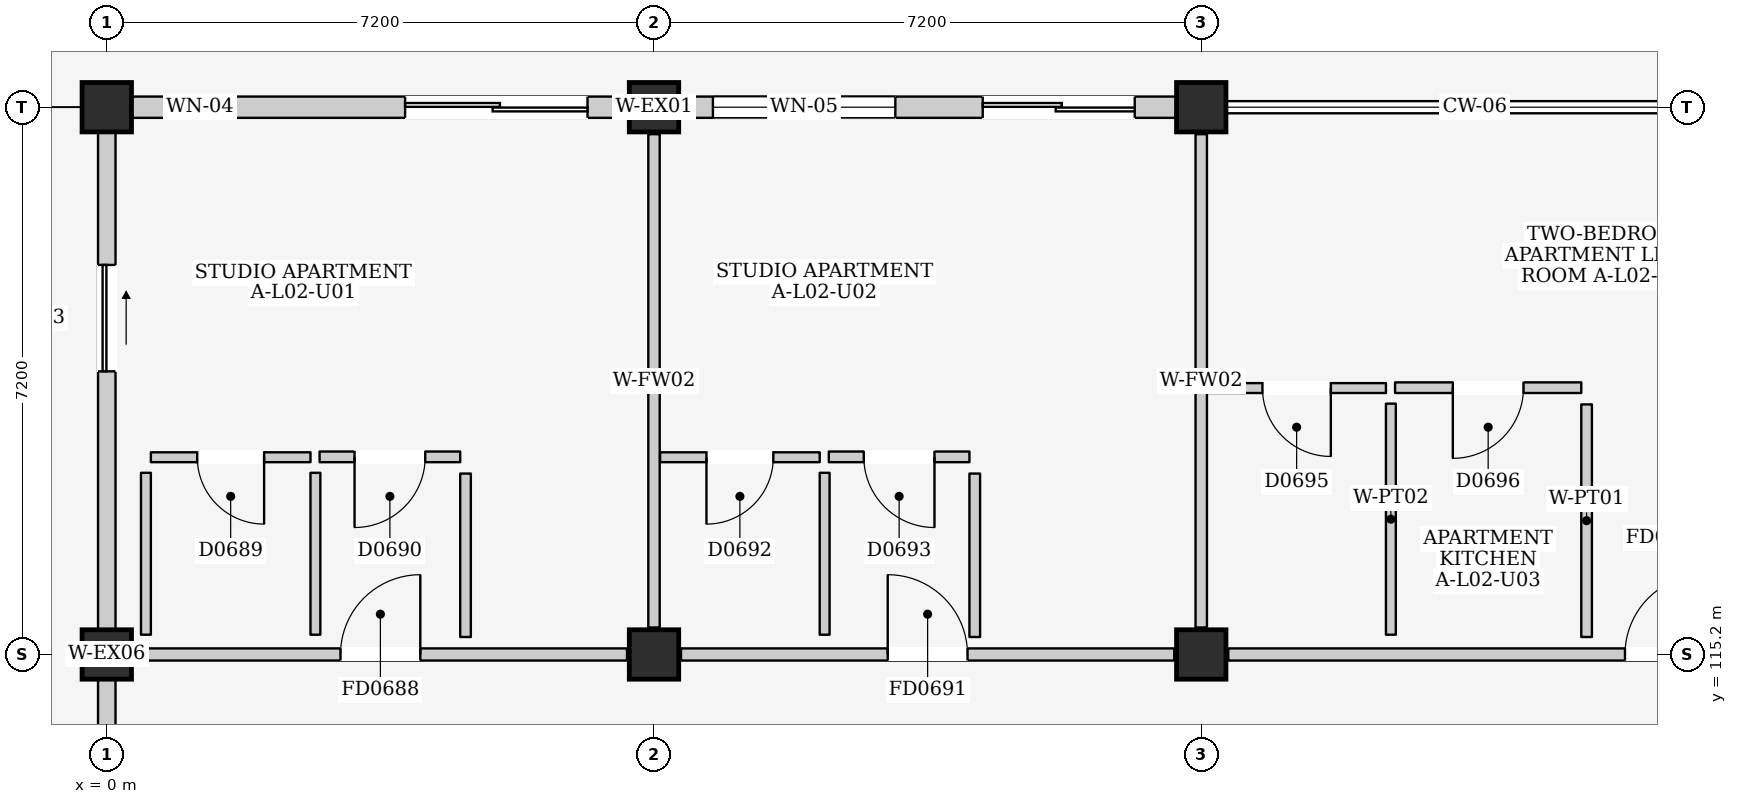
"""IFC4 building model, lengths in metres.
Left out: names, types, materials, properties, quantities, classifications, styles, units other than length and angle.
Written with IfcOpenShell. Run it as: python <this file> out.ifc"""

import sys

from ifc_helpers import new_model, si_unit, direction, frame, frame_2d, origin, origin_2d, place, context, subcontext, project, spatial, rectangle, extrude, element, fill, save


model = new_model("IFC4")
c1 = context("Model", 3, precision=1e-05, world=origin(), true_north=direction((0.0, 1.0)))
c2 = subcontext(c1, "Body", "Model", "MODEL_VIEW")
j1 = project(units=[si_unit("LENGTHUNIT", "METRE"), si_unit("PLANEANGLEUNIT", "RADIAN")], contexts=[c1])
p1 = place(None, origin())
s1 = spatial("IfcSite", under=j1, at=p1, CompositionType="ELEMENT")
p2 = place(p1, origin())
s2 = spatial("IfcBuilding", under=s1, at=p2, CompositionType="ELEMENT")
p3 = place(p2, frame((0.0, 0.0, 9.0)))
s3 = spatial("IfcBuildingStorey", under=s2, at=p3, CompositionType="ELEMENT", Elevation=9.0)
for number, where, z_axis, x_axis in (
    (1, (0.0, 115.2, 0.0), (0.0, 0.0, 1.0), (1.0, 0.0, 0.0)),
    (2, (0.0, 122.4, 0.0), (0.0, 0.0, 1.0), (1.0, 0.0, 0.0)),
    (3, (7.2, 115.2, 0.0), (0.0, 0.0, 1.0), (1.0, 0.0, 0.0)),
    (4, (7.2, 122.4, 0.0), (0.0, 0.0, 1.0), (1.0, 0.0, 0.0)),
    (5, (14.4, 115.2, 0.0), (0.0, 0.0, 1.0), (1.0, 0.0, 0.0)),
    (6, (14.4, 122.4, 0.0), (0.0, 0.0, 1.0), (1.0, 0.0, 0.0)),
):
    element("IfcColumn", number, at=place(p3, frame(where, z_axis=z_axis, x_axis=x_axis)), inside=s3, PredefinedType="COLUMN", context=c2, shape_type="SweptSolid", body=[
        extrude(rectangle(XDim=0.65, YDim=0.65, at=origin_2d()), origin(), (0.0, 0.0, 1.0), 3.2),
    ])
p4 = place(p3, frame((0.325, 122.4, 0.0), z_axis=(0.0, 0.0, 1.0), x_axis=(1.0, 0.0, 0.0)))
e7 = element("IfcWall", 7, at=p4, inside=s3, PredefinedType="ELEMENTEDWALL", context=c2, shape_type="SweptSolid", body=[
    extrude(rectangle(XDim=6.55, YDim=0.28, at=frame_2d((3.275, 0.0))), origin(), (0.0, 0.0, 1.0), 2.425),
])
p5 = place(p4, frame((3.6, 0.0, 0.0)))
e8 = element("IfcOpeningElement", 8, at=p5, cuts=e7, PredefinedType="OPENING", context=c2, shape_type="SweptSolid", body=[
    extrude(rectangle(XDim=2.4, YDim=2.12, at=frame_2d((1.2, 1.06))), frame((0.0, 0.155, 0.0), z_axis=(0.0, -1.0, 0.0), x_axis=(1.0, 0.0, 0.0)), (0.0, 0.0, 1.0), 0.31),
])
p6 = place(p4, frame((0.45, 0.0, 0.9)))
e9 = element("IfcOpeningElement", 9, at=p6, cuts=e7, PredefinedType="OPENING", context=c2, shape_type="SweptSolid", body=[
    extrude(rectangle(XDim=0.9, YDim=1.1, at=frame_2d((0.45, 0.55))), frame((0.0, 0.155, 0.0), z_axis=(0.0, -1.0, 0.0), x_axis=(1.0, 0.0, 0.0)), (0.0, 0.0, 1.0), 0.31),
])
p7 = place(p3, frame((7.525, 122.4, 0.0), z_axis=(0.0, 0.0, 1.0), x_axis=(1.0, 0.0, 0.0)))
e10 = element("IfcWall", 10, at=p7, inside=s3, PredefinedType="ELEMENTEDWALL", context=c2, shape_type="SweptSolid", body=[
    extrude(rectangle(XDim=6.55, YDim=0.28, at=frame_2d((3.275, 0.0))), origin(), (0.0, 0.0, 1.0), 2.425),
])
p8 = place(p7, frame((4.0, 0.0, 0.0)))
e11 = element("IfcOpeningElement", 11, at=p8, cuts=e10, PredefinedType="OPENING", context=c2, shape_type="SweptSolid", body=[
    extrude(rectangle(XDim=2.0, YDim=2.12, at=frame_2d((1.0, 1.06))), frame((0.0, 0.155, 0.0), z_axis=(0.0, -1.0, 0.0), x_axis=(1.0, 0.0, 0.0)), (0.0, 0.0, 1.0), 0.31),
])
p9 = place(p7, frame((0.45, 0.0, 0.665)))
e12 = element("IfcOpeningElement", 12, at=p9, cuts=e10, PredefinedType="OPENING", context=c2, shape_type="SweptSolid", body=[
    extrude(rectangle(XDim=2.4, YDim=1.65, at=frame_2d((1.2, 0.825))), frame((0.0, 0.155, 0.0), z_axis=(0.0, -1.0, 0.0), x_axis=(1.0, 0.0, 0.0)), (0.0, 0.0, 1.0), 0.31),
])
p10 = place(p3, frame((0.0, 108.325, 0.0), z_axis=(0.0, 0.0, 1.0), x_axis=(0.0, 1.0, 0.0)))
e13 = element("IfcWall", 13, at=p10, inside=s3, PredefinedType="ELEMENTEDWALL", context=c2, shape_type="SweptSolid", body=[
    extrude(rectangle(XDim=6.55, YDim=0.23, at=frame_2d((3.275, 0.0))), origin(), (0.0, 0.0, 1.0), 2.425),
])
p11 = place(p10, frame((2.75, 0.0, 1.1)))
e14 = element("IfcOpeningElement", 14, at=p11, cuts=e13, PredefinedType="OPENING", context=c2, shape_type="SweptSolid", body=[
    extrude(rectangle(XDim=1.0, YDim=0.9, at=frame_2d((0.5, 0.45))), frame((0.0, 0.13, 0.0), z_axis=(0.0, -1.0, 0.0), x_axis=(1.0, 0.0, 0.0)), (0.0, 0.0, 1.0), 0.26),
])
p12 = place(p3, frame((0.0, 115.525, 0.0), z_axis=(0.0, 0.0, 1.0), x_axis=(0.0, 1.0, 0.0)))
e15 = element("IfcWall", 15, at=p12, inside=s3, PredefinedType="ELEMENTEDWALL", context=c2, shape_type="SweptSolid", body=[
    extrude(rectangle(XDim=6.55, YDim=0.23, at=frame_2d((3.275, 0.0))), origin(), (0.0, 0.0, 1.0), 2.425),
])
p13 = place(p12, frame((3.4, 0.0, 0.0)))
e16 = element("IfcOpeningElement", 16, at=p13, cuts=e15, PredefinedType="OPENING", context=c2, shape_type="SweptSolid", body=[
    extrude(rectangle(XDim=1.4, YDim=2.1, at=frame_2d((0.7, 1.05))), frame((0.0, 0.13, 0.0), z_axis=(0.0, -1.0, 0.0), x_axis=(1.0, 0.0, 0.0)), (0.0, 0.0, 1.0), 0.26),
])
p14 = place(p3, frame((0.355, 115.2, 0.0), z_axis=(0.0, 0.0, 1.0), x_axis=(1.0, 0.0, 0.0)))
e17 = element("IfcWall", 17, at=p14, inside=s3, PredefinedType="PARTITIONING", context=c2, shape_type="SweptSolid", body=[
    extrude(rectangle(XDim=6.49, YDim=0.16, at=frame_2d((3.245, 0.0))), origin(), (0.0, 0.0, 1.0), 2.295),
])
p15 = place(p14, frame((2.72, 0.0, 0.0)))
e18 = element("IfcOpeningElement", 18, at=p15, cuts=e17, PredefinedType="OPENING", context=c2, shape_type="SweptSolid", body=[
    extrude(rectangle(XDim=1.05, YDim=2.15, at=frame_2d((0.525, 1.075))), frame((0.0, 0.095, 0.0), z_axis=(0.0, -1.0, 0.0), x_axis=(1.0, 0.0, 0.0)), (0.0, 0.0, 1.0), 0.19),
])
p16 = place(p3, frame((7.2, 115.555, 0.0), z_axis=(0.0, 0.0, 1.0), x_axis=(0.0, 1.0, 0.0)))
e19 = element("IfcWall", 19, at=p16, inside=s3, PredefinedType="PARTITIONING", context=c2, shape_type="SweptSolid", body=[
    extrude(rectangle(XDim=6.49, YDim=0.15, at=frame_2d((3.245, 0.0))), origin(), (0.0, 0.0, 1.0), 2.395),
])
p17 = place(p3, frame((0.58, 117.795, 0.0), z_axis=(0.0, 0.0, 1.0), x_axis=(1.0, 0.0, 0.0)))
e20 = element("IfcWall", 20, at=p17, inside=s3, PredefinedType="PARTITIONING", context=c2, shape_type="SweptSolid", body=[
    extrude(rectangle(XDim=2.1, YDim=0.13, at=frame_2d((1.05, 0.0))), origin(), (0.0, 0.0, 1.0), 2.96),
])
p18 = place(p17, frame((0.61, 0.0, 0.0)))
e21 = element("IfcOpeningElement", 21, at=p18, cuts=e20, PredefinedType="OPENING", context=c2, shape_type="SweptSolid", body=[
    extrude(rectangle(XDim=0.88, YDim=2.1, at=frame_2d((0.44, 1.05))), frame((0.0, 0.08, 0.0), z_axis=(0.0, -1.0, 0.0), x_axis=(1.0, 0.0, 0.0)), (0.0, 0.0, 1.0), 0.16),
])
for number, where, z_axis, x_axis in (
    (22, (2.745, 115.46, 0.0), (0.0, 0.0, 1.0), (0.0, 1.0, 0.0)),
    (23, (0.515, 115.46, 0.0), (0.0, 0.0, 1.0), (0.0, 1.0, 0.0)),
):
    element("IfcWall", number, at=place(p3, frame(where, z_axis=z_axis, x_axis=x_axis)), inside=s3, PredefinedType="PARTITIONING", context=c2, shape_type="SweptSolid", body=[
        extrude(rectangle(XDim=2.13, YDim=0.13, at=frame_2d((1.065, 0.0))), origin(), (0.0, 0.0, 1.0), 2.96),
    ])
p19 = place(p3, frame((2.8, 117.8, 0.0), z_axis=(0.0, 0.0, 1.0), x_axis=(1.0, 0.0, 0.0)))
e24 = element("IfcWall", 24, at=p19, inside=s3, PredefinedType="PARTITIONING", context=c2, shape_type="SweptSolid", body=[
    extrude(rectangle(XDim=1.85, YDim=0.14, at=frame_2d((0.925, 0.0))), origin(), (0.0, 0.0, 1.0), 2.96),
])
p20 = place(p19, frame((0.46, 0.0, 0.0)))
e25 = element("IfcOpeningElement", 25, at=p20, cuts=e24, PredefinedType="OPENING", context=c2, shape_type="SweptSolid", body=[
    extrude(rectangle(XDim=0.93, YDim=2.14, at=frame_2d((0.465, 1.07))), frame((0.0, 0.085, 0.0), z_axis=(0.0, -1.0, 0.0), x_axis=(1.0, 0.0, 0.0)), (0.0, 0.0, 1.0), 0.17),
])
p21 = place(p3, frame((4.72, 115.43, 0.0), z_axis=(0.0, 0.0, 1.0), x_axis=(0.0, 1.0, 0.0)))
e26 = element("IfcWall", 26, at=p21, inside=s3, PredefinedType="PARTITIONING", context=c2, shape_type="SweptSolid", body=[
    extrude(rectangle(XDim=2.15, YDim=0.14, at=frame_2d((1.075, 0.0))), origin(), (0.0, 0.0, 1.0), 2.96),
])
p22 = place(p3, frame((7.555, 115.2, 0.0), z_axis=(0.0, 0.0, 1.0), x_axis=(1.0, 0.0, 0.0)))
e27 = element("IfcWall", 27, at=p22, inside=s3, PredefinedType="PARTITIONING", context=c2, shape_type="SweptSolid", body=[
    extrude(rectangle(XDim=6.49, YDim=0.16, at=frame_2d((3.245, 0.0))), origin(), (0.0, 0.0, 1.0), 2.295),
])
p23 = place(p22, frame((2.72, 0.0, 0.0)))
e28 = element("IfcOpeningElement", 28, at=p23, cuts=e27, PredefinedType="OPENING", context=c2, shape_type="SweptSolid", body=[
    extrude(rectangle(XDim=1.05, YDim=2.15, at=frame_2d((0.525, 1.075))), frame((0.0, 0.095, 0.0), z_axis=(0.0, -1.0, 0.0), x_axis=(1.0, 0.0, 0.0)), (0.0, 0.0, 1.0), 0.19),
])
p24 = place(p3, frame((14.4, 115.555, 0.0), z_axis=(0.0, 0.0, 1.0), x_axis=(0.0, 1.0, 0.0)))
e29 = element("IfcWall", 29, at=p24, inside=s3, PredefinedType="PARTITIONING", context=c2, shape_type="SweptSolid", body=[
    extrude(rectangle(XDim=6.49, YDim=0.15, at=frame_2d((3.245, 0.0))), origin(), (0.0, 0.0, 1.0), 2.395),
])
p25 = place(p3, frame((7.28, 117.795, 0.0), z_axis=(0.0, 0.0, 1.0), x_axis=(1.0, 0.0, 0.0)))
e30 = element("IfcWall", 30, at=p25, inside=s3, PredefinedType="PARTITIONING", context=c2, shape_type="SweptSolid", body=[
    extrude(rectangle(XDim=2.1, YDim=0.13, at=frame_2d((1.05, 0.0))), origin(), (0.0, 0.0, 1.0), 2.96),
])
p26 = place(p25, frame((0.61, 0.0, 0.0)))
e31 = element("IfcOpeningElement", 31, at=p26, cuts=e30, PredefinedType="OPENING", context=c2, shape_type="SweptSolid", body=[
    extrude(rectangle(XDim=0.88, YDim=2.1, at=frame_2d((0.44, 1.05))), frame((0.0, 0.08, 0.0), z_axis=(0.0, -1.0, 0.0), x_axis=(1.0, 0.0, 0.0)), (0.0, 0.0, 1.0), 0.16),
])
p27 = place(p3, frame((9.445, 115.46, 0.0), z_axis=(0.0, 0.0, 1.0), x_axis=(0.0, 1.0, 0.0)))
e32 = element("IfcWall", 32, at=p27, inside=s3, PredefinedType="PARTITIONING", context=c2, shape_type="SweptSolid", body=[
    extrude(rectangle(XDim=2.13, YDim=0.13, at=frame_2d((1.065, 0.0))), origin(), (0.0, 0.0, 1.0), 2.96),
])
p28 = place(p3, frame((9.5, 117.8, 0.0), z_axis=(0.0, 0.0, 1.0), x_axis=(1.0, 0.0, 0.0)))
e33 = element("IfcWall", 33, at=p28, inside=s3, PredefinedType="PARTITIONING", context=c2, shape_type="SweptSolid", body=[
    extrude(rectangle(XDim=1.85, YDim=0.14, at=frame_2d((0.925, 0.0))), origin(), (0.0, 0.0, 1.0), 2.96),
])
p29 = place(p28, frame((0.46, 0.0, 0.0)))
e34 = element("IfcOpeningElement", 34, at=p29, cuts=e33, PredefinedType="OPENING", context=c2, shape_type="SweptSolid", body=[
    extrude(rectangle(XDim=0.93, YDim=2.14, at=frame_2d((0.465, 1.07))), frame((0.0, 0.085, 0.0), z_axis=(0.0, -1.0, 0.0), x_axis=(1.0, 0.0, 0.0)), (0.0, 0.0, 1.0), 0.17),
])
p30 = place(p3, frame((11.42, 115.43, 0.0), z_axis=(0.0, 0.0, 1.0), x_axis=(0.0, 1.0, 0.0)))
e35 = element("IfcWall", 35, at=p30, inside=s3, PredefinedType="PARTITIONING", context=c2, shape_type="SweptSolid", body=[
    extrude(rectangle(XDim=2.15, YDim=0.14, at=frame_2d((1.075, 0.0))), origin(), (0.0, 0.0, 1.0), 2.96),
])
p31 = place(p3, frame((14.755, 115.2, 0.0), z_axis=(0.0, 0.0, 1.0), x_axis=(1.0, 0.0, 0.0)))
e36 = element("IfcWall", 36, at=p31, inside=s3, PredefinedType="PARTITIONING", context=c2, shape_type="SweptSolid", body=[
    extrude(rectangle(XDim=6.49, YDim=0.16, at=frame_2d((3.245, 0.0))), origin(), (0.0, 0.0, 1.0), 2.295),
])
p32 = place(p31, frame((5.22, 0.0, 0.0)))
e37 = element("IfcOpeningElement", 37, at=p32, cuts=e36, PredefinedType="OPENING", context=c2, shape_type="SweptSolid", body=[
    extrude(rectangle(XDim=1.05, YDim=2.15, at=frame_2d((0.525, 1.075))), frame((0.0, 0.095, 0.0), z_axis=(0.0, -1.0, 0.0), x_axis=(1.0, 0.0, 0.0)), (0.0, 0.0, 1.0), 0.19),
])
p33 = place(p3, frame((14.48, 118.705, 0.0), z_axis=(0.0, 0.0, 1.0), x_axis=(1.0, 0.0, 0.0)))
e38 = element("IfcWall", 38, at=p33, inside=s3, PredefinedType="PARTITIONING", context=c2, shape_type="SweptSolid", body=[
    extrude(rectangle(XDim=2.35, YDim=0.13, at=frame_2d((1.175, 0.0))), origin(), (0.0, 0.0, 1.0), 2.96),
])
p34 = place(p33, frame((0.725, 0.0, 0.0)))
e39 = element("IfcOpeningElement", 39, at=p34, cuts=e38, PredefinedType="OPENING", context=c2, shape_type="SweptSolid", body=[
    extrude(rectangle(XDim=0.9, YDim=2.1, at=frame_2d((0.45, 1.05))), frame((0.0, 0.08, 0.0), z_axis=(0.0, -1.0, 0.0), x_axis=(1.0, 0.0, 0.0)), (0.0, 0.0, 1.0), 0.16),
])
p35 = place(p3, frame((16.895, 115.46, 0.0), z_axis=(0.0, 0.0, 1.0), x_axis=(0.0, 1.0, 0.0)))
e40 = element("IfcWall", 40, at=p35, inside=s3, PredefinedType="PARTITIONING", context=c2, shape_type="SweptSolid", body=[
    extrude(rectangle(XDim=3.04, YDim=0.13, at=frame_2d((1.52, 0.0))), origin(), (0.0, 0.0, 1.0), 2.96),
])
p36 = place(p3, frame((16.95, 118.71, 0.0), z_axis=(0.0, 0.0, 1.0), x_axis=(1.0, 0.0, 0.0)))
e41 = element("IfcWall", 41, at=p36, inside=s3, PredefinedType="PARTITIONING", context=c2, shape_type="SweptSolid", body=[
    extrude(rectangle(XDim=2.45, YDim=0.14, at=frame_2d((1.225, 0.0))), origin(), (0.0, 0.0, 1.0), 2.96),
])
p37 = place(p36, frame((0.76, 0.0, 0.0)))
e42 = element("IfcOpeningElement", 42, at=p37, cuts=e41, PredefinedType="OPENING", context=c2, shape_type="SweptSolid", body=[
    extrude(rectangle(XDim=0.93, YDim=2.14, at=frame_2d((0.465, 1.07))), frame((0.0, 0.085, 0.0), z_axis=(0.0, -1.0, 0.0), x_axis=(1.0, 0.0, 0.0)), (0.0, 0.0, 1.0), 0.17),
])
p38 = place(p3, frame((19.47, 115.43, 0.0), z_axis=(0.0, 0.0, 1.0), x_axis=(0.0, 1.0, 0.0)))
e43 = element("IfcWall", 43, at=p38, inside=s3, PredefinedType="PARTITIONING", context=c2, shape_type="SweptSolid", body=[
    extrude(rectangle(XDim=3.06, YDim=0.14, at=frame_2d((1.53, 0.0))), origin(), (0.0, 0.0, 1.0), 2.96),
])
p39 = place(p5, frame((2.4, 0.0, 0.0), z_axis=(0.0, 0.0, 1.0), x_axis=(-1.0, 0.0, 0.0)))
e44 = element("IfcDoor", 44, at=p39, inside=s3, OperationType="DOUBLE_DOOR_SLIDING", PredefinedType="DOOR", context=c2, shape_type="SweptSolid", body=[
    extrude(rectangle(XDim=2.4, YDim=2.12, at=frame_2d((1.2, 1.06))), frame((0.0, 0.025, 0.0), z_axis=(0.0, -1.0, 0.0), x_axis=(1.0, 0.0, 0.0)), (0.0, 0.0, 1.0), 0.05),
])
fill(e8, e44)
p40 = place(p6, origin())
e45 = element("IfcWindow", 45, at=p40, inside=s3, PartitioningType="SINGLE_PANEL", PredefinedType="WINDOW", context=c2, shape_type="SweptSolid", body=[
    extrude(rectangle(XDim=0.9, YDim=1.1, at=frame_2d((0.45, 0.55))), frame((0.0, 0.03, 0.0), z_axis=(0.0, -1.0, 0.0), x_axis=(1.0, 0.0, 0.0)), (0.0, 0.0, 1.0), 0.06),
])
fill(e9, e45)
p41 = place(p8, frame((2.0, 0.0, 0.0), z_axis=(0.0, 0.0, 1.0), x_axis=(-1.0, 0.0, 0.0)))
e46 = element("IfcDoor", 46, at=p41, inside=s3, OperationType="DOUBLE_DOOR_SLIDING", PredefinedType="DOOR", context=c2, shape_type="SweptSolid", body=[
    extrude(rectangle(XDim=2.0, YDim=2.12, at=frame_2d((1.0, 1.06))), frame((0.0, 0.025, 0.0), z_axis=(0.0, -1.0, 0.0), x_axis=(1.0, 0.0, 0.0)), (0.0, 0.0, 1.0), 0.05),
])
fill(e11, e46)
p42 = place(p9, origin())
e47 = element("IfcWindow", 47, at=p42, inside=s3, PartitioningType="TRIPLE_PANEL_VERTICAL", PredefinedType="WINDOW", context=c2, shape_type="SweptSolid", body=[
    extrude(rectangle(XDim=2.4, YDim=1.65, at=frame_2d((1.2, 0.825))), frame((0.0, 0.03, 0.0), z_axis=(0.0, -1.0, 0.0), x_axis=(1.0, 0.0, 0.0)), (0.0, 0.0, 1.0), 0.06),
])
fill(e12, e47)
p43 = place(p13, frame((1.4, 0.0, 0.0), z_axis=(0.0, 0.0, 1.0), x_axis=(-1.0, 0.0, 0.0)))
e48 = element("IfcDoor", 48, at=p43, inside=s3, OperationType="SLIDING_TO_RIGHT", PredefinedType="DOOR", context=c2, shape_type="SweptSolid", body=[
    extrude(rectangle(XDim=1.4, YDim=2.1, at=frame_2d((0.7, 1.05))), frame((0.0, 0.025, 0.0), z_axis=(0.0, -1.0, 0.0), x_axis=(1.0, 0.0, 0.0)), (0.0, 0.0, 1.0), 0.05),
])
fill(e16, e48)
p44 = place(p15, origin())
e49 = element("IfcDoor", 49, at=p44, inside=s3, OperationType="SINGLE_SWING_RIGHT", PredefinedType="DOOR", context=c2, shape_type="SweptSolid", body=[
    extrude(rectangle(XDim=1.05, YDim=2.15, at=frame_2d((0.525, 1.075))), frame((0.0, 0.025, 0.0), z_axis=(0.0, -1.0, 0.0), x_axis=(1.0, 0.0, 0.0)), (0.0, 0.0, 1.0), 0.05),
])
fill(e18, e49)
p45 = place(p18, frame((0.88, 0.0, 0.0), z_axis=(0.0, 0.0, 1.0), x_axis=(-1.0, 0.0, 0.0)))
e50 = element("IfcDoor", 50, at=p45, inside=s3, OperationType="SINGLE_SWING_LEFT", PredefinedType="DOOR", context=c2, shape_type="SweptSolid", body=[
    extrude(rectangle(XDim=0.88, YDim=2.1, at=frame_2d((0.44, 1.05))), frame((0.0, 0.025, 0.0), z_axis=(0.0, -1.0, 0.0), x_axis=(1.0, 0.0, 0.0)), (0.0, 0.0, 1.0), 0.05),
])
fill(e21, e50)
p46 = place(p20, frame((0.93, 0.0, 0.0), z_axis=(0.0, 0.0, 1.0), x_axis=(-1.0, 0.0, 0.0)))
e51 = element("IfcDoor", 51, at=p46, inside=s3, OperationType="SINGLE_SWING_RIGHT", PredefinedType="DOOR", context=c2, shape_type="SweptSolid", body=[
    extrude(rectangle(XDim=0.93, YDim=2.14, at=frame_2d((0.465, 1.07))), frame((0.0, 0.025, 0.0), z_axis=(0.0, -1.0, 0.0), x_axis=(1.0, 0.0, 0.0)), (0.0, 0.0, 1.0), 0.05),
])
fill(e25, e51)
p47 = place(p23, origin())
e52 = element("IfcDoor", 52, at=p47, inside=s3, OperationType="SINGLE_SWING_LEFT", PredefinedType="DOOR", context=c2, shape_type="SweptSolid", body=[
    extrude(rectangle(XDim=1.05, YDim=2.15, at=frame_2d((0.525, 1.075))), frame((0.0, 0.025, 0.0), z_axis=(0.0, -1.0, 0.0), x_axis=(1.0, 0.0, 0.0)), (0.0, 0.0, 1.0), 0.05),
])
fill(e28, e52)
p48 = place(p26, frame((0.88, 0.0, 0.0), z_axis=(0.0, 0.0, 1.0), x_axis=(-1.0, 0.0, 0.0)))
e53 = element("IfcDoor", 53, at=p48, inside=s3, OperationType="SINGLE_SWING_RIGHT", PredefinedType="DOOR", context=c2, shape_type="SweptSolid", body=[
    extrude(rectangle(XDim=0.88, YDim=2.1, at=frame_2d((0.44, 1.05))), frame((0.0, 0.025, 0.0), z_axis=(0.0, -1.0, 0.0), x_axis=(1.0, 0.0, 0.0)), (0.0, 0.0, 1.0), 0.05),
])
fill(e31, e53)
p49 = place(p29, frame((0.93, 0.0, 0.0), z_axis=(0.0, 0.0, 1.0), x_axis=(-1.0, 0.0, 0.0)))
e54 = element("IfcDoor", 54, at=p49, inside=s3, OperationType="SINGLE_SWING_LEFT", PredefinedType="DOOR", context=c2, shape_type="SweptSolid", body=[
    extrude(rectangle(XDim=0.93, YDim=2.14, at=frame_2d((0.465, 1.07))), frame((0.0, 0.025, 0.0), z_axis=(0.0, -1.0, 0.0), x_axis=(1.0, 0.0, 0.0)), (0.0, 0.0, 1.0), 0.05),
])
fill(e34, e54)
p50 = place(p32, origin())
e55 = element("IfcDoor", 55, at=p50, inside=s3, OperationType="SINGLE_SWING_RIGHT", PredefinedType="DOOR", context=c2, shape_type="SweptSolid", body=[
    extrude(rectangle(XDim=1.05, YDim=2.15, at=frame_2d((0.525, 1.075))), frame((0.0, 0.025, 0.0), z_axis=(0.0, -1.0, 0.0), x_axis=(1.0, 0.0, 0.0)), (0.0, 0.0, 1.0), 0.05),
])
fill(e37, e55)
p51 = place(p34, frame((0.9, 0.0, 0.0), z_axis=(0.0, 0.0, 1.0), x_axis=(-1.0, 0.0, 0.0)))
e56 = element("IfcDoor", 56, at=p51, inside=s3, OperationType="SINGLE_SWING_LEFT", PredefinedType="DOOR", context=c2, shape_type="SweptSolid", body=[
    extrude(rectangle(XDim=0.9, YDim=2.1, at=frame_2d((0.45, 1.05))), frame((0.0, 0.025, 0.0), z_axis=(0.0, -1.0, 0.0), x_axis=(1.0, 0.0, 0.0)), (0.0, 0.0, 1.0), 0.05),
])
fill(e39, e56)
p52 = place(p37, frame((0.93, 0.0, 0.0), z_axis=(0.0, 0.0, 1.0), x_axis=(-1.0, 0.0, 0.0)))
e57 = element("IfcDoor", 57, at=p52, inside=s3, OperationType="SINGLE_SWING_RIGHT", PredefinedType="DOOR", context=c2, shape_type="SweptSolid", body=[
    extrude(rectangle(XDim=0.93, YDim=2.14, at=frame_2d((0.465, 1.07))), frame((0.0, 0.025, 0.0), z_axis=(0.0, -1.0, 0.0), x_axis=(1.0, 0.0, 0.0)), (0.0, 0.0, 1.0), 0.05),
])
fill(e42, e57)
save(model, sys.argv[1])
